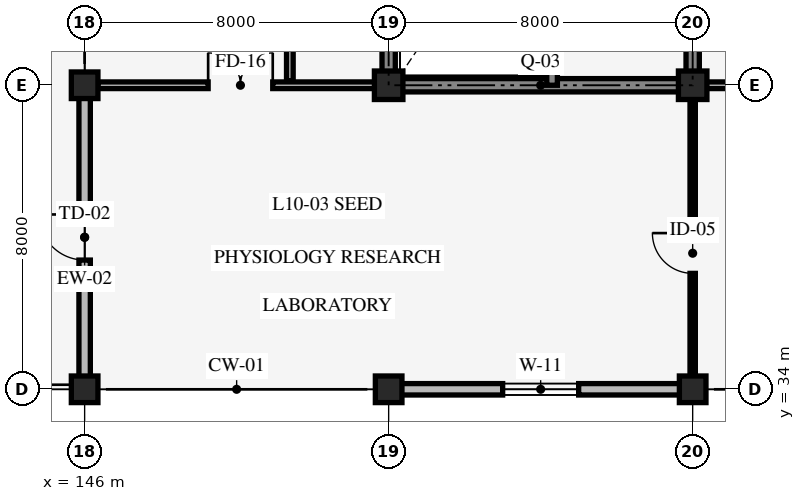
"""IFC4 building model, lengths in metres.
Left out: names, types, materials, properties, quantities, classifications, styles, units other than length and angle.
Written with IfcOpenShell. Run it as: python <this file> out.ifc"""

import sys

from ifc_helpers import new_model, si_unit, direction, frame, frame_2d, origin, origin_2d, place, context, subcontext, project, spatial, rectangle, extrude, element, fill, save


model = new_model("IFC4")
c1 = context("Model", 3, precision=1e-05, world=origin(), true_north=direction((0.0, 1.0)))
c2 = subcontext(c1, "Body", "Model", "MODEL_VIEW")
j1 = project(units=[si_unit("LENGTHUNIT", "METRE"), si_unit("PLANEANGLEUNIT", "RADIAN")], contexts=[c1])
p1 = place(None, origin())
s1 = spatial("IfcSite", under=j1, at=p1, CompositionType="ELEMENT")
p2 = place(p1, origin())
s2 = spatial("IfcBuilding", under=s1, at=p2, CompositionType="ELEMENT")
p3 = place(p2, frame((0.0, 0.0, 40.2)))
s3 = spatial("IfcBuildingStorey", under=s2, at=p3, CompositionType="ELEMENT", Elevation=40.2)
p4 = place(p3, frame((154.0, 42.0, 0.0), z_axis=(0.0, 0.0, 1.0), x_axis=(1.0, 0.0, 0.0)))
e1 = element("IfcWall", 1, at=p4, inside=s3, PredefinedType="SHEAR", context=c2, shape_type="SweptSolid", body=[
    extrude(rectangle(XDim=8.0, YDim=0.35, at=frame_2d((4.0, 0.0))), origin(), (0.0, 0.0, 1.0), 3.95),
])
p5 = place(p3, frame((162.0, 42.0, 0.0), z_axis=(0.0, 0.0, 1.0), x_axis=(0.0, 1.0, 0.0)))
e2 = element("IfcWall", 2, at=p5, inside=s3, PredefinedType="SHEAR", context=c2, shape_type="SweptSolid", body=[
    extrude(rectangle(XDim=8.0, YDim=0.35, at=frame_2d((4.0, 0.0))), origin(), (0.0, 0.0, 1.0), 3.95),
])
p6 = place(p5, frame((3.175, 0.0, 0.0)))
e3 = element("IfcOpeningElement", 3, at=p6, cuts=e2, PredefinedType="OPENING", context=c2, shape_type="SweptSolid", body=[
    extrude(rectangle(XDim=1.05, YDim=2.2, at=frame_2d((0.525, 1.1))), frame((0.0, 0.185, 0.0), z_axis=(0.0, -1.0, 0.0), x_axis=(1.0, 0.0, 0.0)), (0.0, 0.0, 1.0), 0.37),
])
p7 = place(p3, frame((154.0, 50.0, 0.0), z_axis=(0.0, 0.0, 1.0), x_axis=(0.0, -1.0, 0.0)))
e4 = element("IfcWall", 4, at=p7, inside=s3, PredefinedType="SHEAR", context=c2, shape_type="SweptSolid", body=[
    extrude(rectangle(XDim=8.0, YDim=0.35, at=frame_2d((4.0, 0.0))), origin(), (0.0, 0.0, 1.0), 3.95),
])
p8 = place(p3, frame((158.3, 42.0, 0.0), z_axis=(0.0, 0.0, 1.0), x_axis=(0.0, 1.0, 0.0)))
e5 = element("IfcWall", 5, at=p8, inside=s3, PredefinedType="SHEAR", context=c2, shape_type="SweptSolid", body=[
    extrude(rectangle(XDim=8.0, YDim=0.28, at=frame_2d((4.0, 0.0))), origin(), (0.0, 0.0, 1.0), 3.95),
])
for number, where, z_axis, x_axis in (
    (6, (146.0, 34.0, 0.0), (0.0, 0.0, 1.0), (1.0, 0.0, 0.0)),
    (7, (146.0, 42.0, 0.0), (0.0, 0.0, 1.0), (1.0, 0.0, 0.0)),
    (8, (154.0, 34.0, 0.0), (0.0, 0.0, 1.0), (1.0, 0.0, 0.0)),
):
    element("IfcColumn", number, at=place(p3, frame(where, z_axis=z_axis, x_axis=x_axis)), inside=s3, PredefinedType="COLUMN", context=c2, shape_type="SweptSolid", body=[
        extrude(rectangle(XDim=0.7, YDim=0.7, at=origin_2d()), origin(), (0.0, 0.0, 1.0), 4.2),
    ])
p9 = place(p3, frame((154.0, 42.0, 0.0), z_axis=(0.0, 0.0, 1.0), x_axis=(1.0, 0.0, 0.0)))
e9 = element("IfcColumn", 9, at=p9, inside=s3, PredefinedType="COLUMN", context=c2, shape_type="SweptSolid", body=[
    extrude(rectangle(XDim=0.75, YDim=0.75, at=origin_2d()), origin(), (0.0, 0.0, 1.0), 4.2),
])
p10 = place(p3, frame((162.0, 34.0, 0.0), z_axis=(0.0, 0.0, 1.0), x_axis=(1.0, 0.0, 0.0)))
e10 = element("IfcColumn", 10, at=p10, inside=s3, PredefinedType="COLUMN", context=c2, shape_type="SweptSolid", body=[
    extrude(rectangle(XDim=0.7, YDim=0.7, at=origin_2d()), origin(), (0.0, 0.0, 1.0), 4.2),
])
p11 = place(p3, frame((162.0, 42.0, 0.0), z_axis=(0.0, 0.0, 1.0), x_axis=(1.0, 0.0, 0.0)))
e11 = element("IfcColumn", 11, at=p11, inside=s3, PredefinedType="COLUMN", context=c2, shape_type="SweptSolid", body=[
    extrude(rectangle(XDim=0.75, YDim=0.75, at=origin_2d()), origin(), (0.0, 0.0, 1.0), 4.2),
])
p12 = place(p3, frame((162.0, 34.0, 0.0), z_axis=(0.0, 0.0, 1.0), x_axis=(-1.0, 0.0, 0.0)))
e12 = element("IfcWall", 12, at=p12, inside=s3, PredefinedType="STANDARD", context=c2, shape_type="SweptSolid", body=[
    extrude(rectangle(XDim=8.0, YDim=0.3, at=frame_2d((4.0, 0.0))), origin(), (0.0, 0.0, 1.0), 3.09),
])
p13 = place(p12, frame((3.0, 0.0, 0.85)))
e13 = element("IfcOpeningElement", 13, at=p13, cuts=e12, PredefinedType="OPENING", context=c2, shape_type="SweptSolid", body=[
    extrude(rectangle(XDim=2.0, YDim=1.5, at=frame_2d((1.0, 0.75))), frame((0.0, 0.16, 0.0), z_axis=(0.0, -1.0, 0.0), x_axis=(1.0, 0.0, 0.0)), (0.0, 0.0, 1.0), 0.32),
])
p14 = place(p3, frame((146.0, 34.0, 0.0), z_axis=(0.0, 0.0, 1.0), x_axis=(0.0, 1.0, 0.0)))
e14 = element("IfcWall", 14, at=p14, inside=s3, PredefinedType="STANDARD", context=c2, shape_type="SweptSolid", body=[
    extrude(rectangle(XDim=8.0, YDim=0.3, at=frame_2d((4.0, 0.0))), origin(), (0.0, 0.0, 1.0), 3.14),
])
p15 = place(p14, frame((3.4, 0.0, 0.0)))
e15 = element("IfcOpeningElement", 15, at=p15, cuts=e14, PredefinedType="OPENING", context=c2, shape_type="SweptSolid", body=[
    extrude(rectangle(XDim=1.2, YDim=2.2, at=frame_2d((0.6, 1.1))), frame((0.0, 0.16, 0.0), z_axis=(0.0, -1.0, 0.0), x_axis=(1.0, 0.0, 0.0)), (0.0, 0.0, 1.0), 0.32),
])
p16 = place(p3, frame((151.4, 42.12, 0.0), z_axis=(0.0, 0.0, 1.0), x_axis=(0.0, 1.0, 0.0)))
e16 = element("IfcWall", 16, at=p16, inside=s3, PredefinedType="STANDARD", context=c2, shape_type="SweptSolid", body=[
    extrude(rectangle(XDim=7.76, YDim=0.175, at=frame_2d((3.88, 0.0))), origin(), (0.0, 0.0, 1.0), 3.9),
])
p17 = place(p16, frame((3.155, 0.0, 0.0)))
e17 = element("IfcOpeningElement", 17, at=p17, cuts=e16, PredefinedType="OPENING", context=c2, shape_type="SweptSolid", body=[
    extrude(rectangle(XDim=1.45, YDim=2.2, at=frame_2d((0.725, 1.1))), frame((0.0, 0.098, 0.0), z_axis=(0.0, -1.0, 0.0), x_axis=(1.0, 0.0, 0.0)), (0.0, 0.0, 1.0), 0.195),
])
p18 = place(p3, frame((146.35, 42.0, 0.0), z_axis=(0.0, 0.0, 1.0), x_axis=(1.0, 0.0, 0.0)))
e18 = element("IfcWall", 18, at=p18, inside=s3, PredefinedType="STANDARD", context=c2, shape_type="SweptSolid", body=[
    extrude(rectangle(XDim=7.3, YDim=0.175, at=frame_2d((3.65, 0.0))), origin(), (0.0, 0.0, 1.0), 3.09),
])
p19 = place(p18, frame((2.9, 0.0, 0.0)))
e19 = element("IfcOpeningElement", 19, at=p19, cuts=e18, PredefinedType="OPENING", context=c2, shape_type="SweptSolid", body=[
    extrude(rectangle(XDim=1.7, YDim=2.3, at=frame_2d((0.85, 1.15))), frame((0.0, 0.098, 0.0), z_axis=(0.0, -1.0, 0.0), x_axis=(1.0, 0.0, 0.0)), (0.0, 0.0, 1.0), 0.195),
])
p20 = place(p3, frame((162.0, 34.05, 0.0), z_axis=(0.0, 0.0, 1.0), x_axis=(0.0, 1.0, 0.0)))
e20 = element("IfcWall", 20, at=p20, inside=s3, PredefinedType="STANDARD", context=c2, shape_type="SweptSolid", body=[
    extrude(rectangle(XDim=7.83, YDim=0.14, at=frame_2d((3.915, 0.0))), origin(), (0.0, 0.0, 1.0), 3.14),
])
p21 = place(p20, frame((3.0, 0.0, 0.0)))
e21 = element("IfcOpeningElement", 21, at=p21, cuts=e20, PredefinedType="OPENING", context=c2, shape_type="SweptSolid", body=[
    extrude(rectangle(XDim=1.06, YDim=2.12, at=frame_2d((0.53, 1.06))), frame((0.0, 0.08, 0.0), z_axis=(0.0, -1.0, 0.0), x_axis=(1.0, 0.0, 0.0)), (0.0, 0.0, 1.0), 0.16),
])
p22 = place(p3, frame((162.35, 42.0, 0.0), z_axis=(0.0, 0.0, 1.0), x_axis=(1.0, 0.0, 0.0)))
e22 = element("IfcWall", 22, at=p22, inside=s3, PredefinedType="STANDARD", context=c2, shape_type="SweptSolid", body=[
    extrude(rectangle(XDim=14.7, YDim=0.175, at=frame_2d((7.35, 0.0))), origin(), (0.0, 0.0, 1.0), 3.09),
])
p23 = place(p22, frame((2.75, 0.0, 0.0)))
e23 = element("IfcOpeningElement", 23, at=p23, cuts=e22, PredefinedType="OPENING", context=c2, shape_type="SweptSolid", body=[
    extrude(rectangle(XDim=1.8, YDim=2.3, at=frame_2d((0.9, 1.15))), frame((0.0, 0.098, 0.0), z_axis=(0.0, -1.0, 0.0), x_axis=(1.0, 0.0, 0.0)), (0.0, 0.0, 1.0), 0.195),
])
p24 = place(p13, origin())
e24 = element("IfcWindow", 24, at=p24, inside=s3, PartitioningType="SINGLE_PANEL", PredefinedType="WINDOW", context=c2, shape_type="SweptSolid", body=[
    extrude(rectangle(XDim=2.0, YDim=1.5, at=frame_2d((1.0, 0.75))), frame((0.0, 0.03, 0.0), z_axis=(0.0, -1.0, 0.0), x_axis=(1.0, 0.0, 0.0)), (0.0, 0.0, 1.0), 0.06),
])
fill(e13, e24)
p25 = place(p15, origin())
e25 = element("IfcDoor", 25, at=p25, inside=s3, OperationType="SINGLE_SWING_RIGHT", PredefinedType="DOOR", context=c2, shape_type="SweptSolid", body=[
    extrude(rectangle(XDim=1.2, YDim=2.2, at=frame_2d((0.6, 1.1))), frame((0.0, 0.025, 0.0), z_axis=(0.0, -1.0, 0.0), x_axis=(1.0, 0.0, 0.0)), (0.0, 0.0, 1.0), 0.05),
])
fill(e15, e25)
p26 = place(p19, origin())
e26 = element("IfcDoor", 26, at=p26, inside=s3, OperationType="DOUBLE_DOOR_SINGLE_SWING", PredefinedType="DOOR", context=c2, shape_type="SweptSolid", body=[
    extrude(rectangle(XDim=1.7, YDim=2.3, at=frame_2d((0.85, 1.15))), frame((0.0, 0.025, 0.0), z_axis=(0.0, -1.0, 0.0), x_axis=(1.0, 0.0, 0.0)), (0.0, 0.0, 1.0), 0.05),
])
fill(e19, e26)
p27 = place(p21, origin())
e27 = element("IfcDoor", 27, at=p27, inside=s3, OperationType="SINGLE_SWING_RIGHT", PredefinedType="DOOR", context=c2, shape_type="SweptSolid", body=[
    extrude(rectangle(XDim=1.06, YDim=2.12, at=frame_2d((0.53, 1.06))), frame((0.0, 0.025, 0.0), z_axis=(0.0, -1.0, 0.0), x_axis=(1.0, 0.0, 0.0)), (0.0, 0.0, 1.0), 0.05),
])
fill(e21, e27)
save(model, sys.argv[1])
